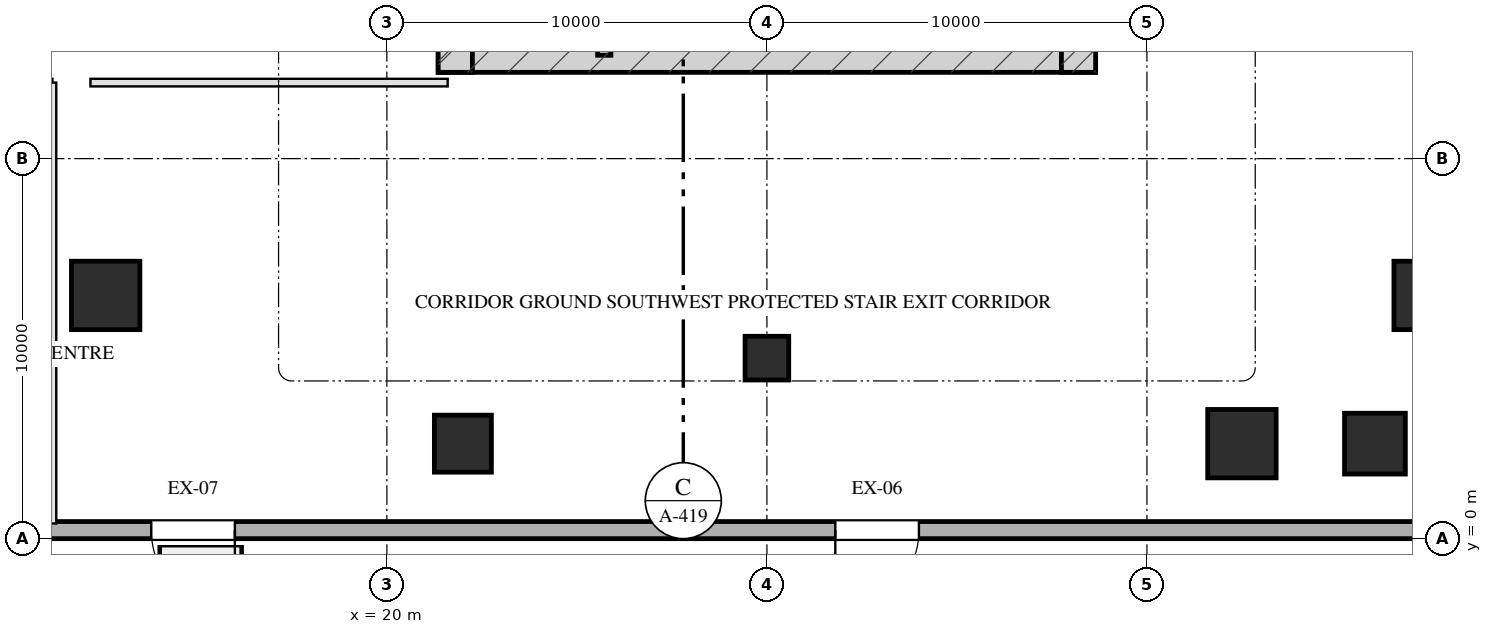
"""IFC4 building model, lengths in metres.
Left out: names, types, materials, properties, quantities, classifications, styles, units other than length and angle.
Written with IfcOpenShell. Run it as: python <this file> out.ifc"""

import sys

from ifc_helpers import new_model, si_unit, direction, frame, frame_2d, origin, origin_2d, place, context, subcontext, project, spatial, rectangle, hollow_rectangle, extrude, element, fill, save


model = new_model("IFC4")
c1 = context("Model", 3, precision=1e-05, world=origin(), true_north=direction((0.0, 1.0)))
c2 = subcontext(c1, "Body", "Model", "MODEL_VIEW")
j1 = project(units=[si_unit("LENGTHUNIT", "METRE"), si_unit("PLANEANGLEUNIT", "RADIAN")], contexts=[c1])
p1 = place(None, origin())
s1 = spatial("IfcSite", under=j1, at=p1, CompositionType="ELEMENT")
p2 = place(p1, origin())
s2 = spatial("IfcBuilding", under=s1, at=p2, CompositionType="ELEMENT")
p3 = place(p2, origin())
s3 = spatial("IfcBuildingStorey", under=s2, at=p3, CompositionType="ELEMENT", Elevation=0.0)
p4 = place(p3, frame((21.35, 12.72, 0.0), z_axis=(0.0, 0.0, 1.0), x_axis=(1.0, 0.0, 0.0)))
e1 = element("IfcWall", 1, at=p4, inside=s3, PredefinedType="SHEAR", context=c2, shape_type="SweptSolid", body=[
    extrude(rectangle(XDim=17.3, YDim=0.9, at=frame_2d((8.65, 0.0))), origin(), (0.0, 0.0, 1.0), 6.0),
])
for number, where, z_axis, x_axis in (
    (2, (21.8, 22.05, 0.0), (0.0, 0.0, 1.0), (0.0, -1.0, 0.0)),
    (3, (38.2, 22.05, 0.0), (0.0, 0.0, 1.0), (0.0, -1.0, 0.0)),
):
    element("IfcWall", number, at=place(p3, frame(where, z_axis=z_axis, x_axis=x_axis)), inside=s3, PredefinedType="SHEAR", context=c2, shape_type="SweptSolid", body=[
        extrude(rectangle(XDim=9.78, YDim=0.9, at=frame_2d((4.89, 0.0))), origin(), (0.0, 0.0, 1.0), 6.0),
    ])
p5 = place(p3, frame((25.72, 19.7, 0.0), z_axis=(0.0, 0.0, 1.0), x_axis=(0.0, -1.0, 0.0)))
e4 = element("IfcWall", 4, at=p5, inside=s3, PredefinedType="SHEAR", context=c2, shape_type="SweptSolid", body=[
    extrude(rectangle(XDim=6.98, YDim=0.35, at=frame_2d((3.49, 0.0))), origin(), (0.0, 0.0, 1.0), 6.0),
])
p6 = place(p3, frame((22.0, 2.5, 0.0), z_axis=(0.0, 0.0, 1.0), x_axis=(1.0, 0.0, 0.0)))
e5 = element("IfcColumn", 5, at=p6, inside=s3, PredefinedType="COLUMN", context=c2, shape_type="SweptSolid", body=[
    extrude(rectangle(XDim=1.5, YDim=1.5, at=origin_2d()), origin(), (0.0, 0.0, 1.0), 6.001),
])
p7 = place(p3, frame((42.5, 2.5, 0.0), z_axis=(0.0, 0.0, 1.0), x_axis=(1.0, 0.0, 0.0)))
e6 = element("IfcColumn", 6, at=p7, inside=s3, PredefinedType="COLUMN", context=c2, shape_type="SweptSolid", body=[
    extrude(hollow_rectangle(XDim=1.8, YDim=1.8, WallThickness=0.06, at=origin_2d()), origin(), (0.0, 0.0, 1.0), 6.001),
])
p8 = place(p3, frame((46.0, 2.5, 0.0), z_axis=(0.0, 0.0, 1.0), x_axis=(1.0, 0.0, 0.0)))
e7 = element("IfcColumn", 7, at=p8, inside=s3, PredefinedType="COLUMN", context=c2, shape_type="SweptSolid", body=[
    extrude(hollow_rectangle(XDim=1.6, YDim=1.6, WallThickness=0.055, at=origin_2d()), origin(), (0.0, 0.0, 1.0), 6.001),
])
for number, where, z_axis, x_axis in (
    (8, (12.6, 6.4, 0.0), (0.0, 0.0, 1.0), (1.0, 0.0, 0.0)),
    (9, (47.4, 6.4, 0.0), (0.0, 0.0, 1.0), (1.0, 0.0, 0.0)),
):
    element("IfcColumn", number, at=place(p3, frame(where, z_axis=z_axis, x_axis=x_axis)), inside=s3, PredefinedType="COLUMN", context=c2, shape_type="SweptSolid", body=[
        extrude(hollow_rectangle(XDim=1.8, YDim=1.8, WallThickness=0.06, at=origin_2d()), origin(), (0.0, 0.0, 1.0), 6.001),
    ])
p9 = place(p3, frame((30.0, 4.75, 0.0), z_axis=(0.0, 0.0, 1.0), x_axis=(1.0, 0.0, 0.0)))
e10 = element("IfcColumn", 10, at=p9, inside=s3, PredefinedType="COLUMN", context=c2, shape_type="SweptSolid", body=[
    extrude(hollow_rectangle(XDim=1.15, YDim=1.15, WallThickness=0.04, at=origin_2d()), origin(), (0.0, 0.0, 1.0), 6.001),
])
p10 = place(p3, frame((120.0, 0.225, 0.0), z_axis=(0.0, 0.0, 1.0), x_axis=(-1.0, 0.0, 0.0)))
e11 = element("IfcWall", 11, at=p10, inside=s3, PredefinedType="SOLIDWALL", context=c2, shape_type="SweptSolid", body=[
    extrude(rectangle(XDim=120.0, YDim=0.45, at=frame_2d((60.0, 0.0))), origin(), (0.0, 0.0, 1.0), 5.7),
])
p11 = place(p10, frame((13.0, 0.0, 0.0)))
e12 = element("IfcOpeningElement", 12, at=p11, cuts=e11, PredefinedType="OPENING", context=c2, shape_type="SweptSolid", body=[
    extrude(rectangle(XDim=2.2, YDim=2.4, at=frame_2d((1.1, 1.2))), frame((0.0, 0.235, 0.0), z_axis=(0.0, -1.0, 0.0), x_axis=(1.0, 0.0, 0.0)), (0.0, 0.0, 1.0), 0.47),
])
p12 = place(p10, frame((27.0, 0.0, 0.0)))
e13 = element("IfcOpeningElement", 13, at=p12, cuts=e11, PredefinedType="OPENING", context=c2, shape_type="SweptSolid", body=[
    extrude(rectangle(XDim=2.2, YDim=2.4, at=frame_2d((1.1, 1.2))), frame((0.0, 0.235, 0.0), z_axis=(0.0, -1.0, 0.0), x_axis=(1.0, 0.0, 0.0)), (0.0, 0.0, 1.0), 0.47),
])
p13 = place(p10, frame((51.0, 0.0, 0.0)))
e14 = element("IfcOpeningElement", 14, at=p13, cuts=e11, PredefinedType="OPENING", context=c2, shape_type="SweptSolid", body=[
    extrude(rectangle(XDim=2.2, YDim=2.4, at=frame_2d((1.1, 1.2))), frame((0.0, 0.235, 0.0), z_axis=(0.0, -1.0, 0.0), x_axis=(1.0, 0.0, 0.0)), (0.0, 0.0, 1.0), 0.47),
])
p14 = place(p10, frame((59.0, 0.0, 0.0)))
e15 = element("IfcOpeningElement", 15, at=p14, cuts=e11, PredefinedType="OPENING", context=c2, shape_type="SweptSolid", body=[
    extrude(rectangle(XDim=2.2, YDim=2.4, at=frame_2d((1.1, 1.2))), frame((0.0, 0.235, 0.0), z_axis=(0.0, -1.0, 0.0), x_axis=(1.0, 0.0, 0.0)), (0.0, 0.0, 1.0), 0.47),
])
p15 = place(p10, frame((67.0, 0.0, 0.0)))
e16 = element("IfcOpeningElement", 16, at=p15, cuts=e11, PredefinedType="OPENING", context=c2, shape_type="SweptSolid", body=[
    extrude(rectangle(XDim=2.2, YDim=2.4, at=frame_2d((1.1, 1.2))), frame((0.0, 0.235, 0.0), z_axis=(0.0, -1.0, 0.0), x_axis=(1.0, 0.0, 0.0)), (0.0, 0.0, 1.0), 0.47),
])
p16 = place(p10, frame((86.0, 0.0, 0.0)))
e17 = element("IfcOpeningElement", 17, at=p16, cuts=e11, PredefinedType="OPENING", context=c2, shape_type="SweptSolid", body=[
    extrude(rectangle(XDim=2.2, YDim=2.4, at=frame_2d((1.1, 1.2))), frame((0.0, 0.235, 0.0), z_axis=(0.0, -1.0, 0.0), x_axis=(1.0, 0.0, 0.0)), (0.0, 0.0, 1.0), 0.47),
])
p17 = place(p10, frame((104.0, 0.0, 0.0)))
e18 = element("IfcOpeningElement", 18, at=p17, cuts=e11, PredefinedType="OPENING", context=c2, shape_type="SweptSolid", body=[
    extrude(rectangle(XDim=2.2, YDim=2.4, at=frame_2d((1.1, 1.2))), frame((0.0, 0.235, 0.0), z_axis=(0.0, -1.0, 0.0), x_axis=(1.0, 0.0, 0.0)), (0.0, 0.0, 1.0), 0.47),
])
p18 = place(p3, frame((11.2, 0.4, 0.0), z_axis=(0.0, 0.0, 1.0), x_axis=(0.0, 1.0, 0.0)))
e19 = element("IfcWall", 19, at=p18, inside=s3, PredefinedType="PARTITIONING", context=c2, shape_type="SweptSolid", body=[
    extrude(rectangle(XDim=11.6, YDim=0.2, at=frame_2d((5.8, 0.0))), origin(), (0.0, 0.0, 1.0), 5.685),
])
p19 = place(p3, frame((12.2, 12.0, 0.0), z_axis=(0.0, 0.0, 1.0), x_axis=(1.0, 0.0, 0.0)))
e20 = element("IfcWall", 20, at=p19, inside=s3, PredefinedType="PARTITIONING", context=c2, shape_type="SweptSolid", body=[
    extrude(rectangle(XDim=9.4, YDim=0.2, at=frame_2d((4.7, 0.0))), origin(), (0.0, 0.0, 1.0), 5.685),
])
p20 = place(p16, origin())
e21 = element("IfcDoor", 21, at=p20, inside=s3, OperationType="SINGLE_SWING_RIGHT", PredefinedType="DOOR", context=c2, shape_type="SweptSolid", body=[
    extrude(rectangle(XDim=2.2, YDim=2.4, at=frame_2d((1.1, 1.2))), frame((0.0, 0.025, 0.0), z_axis=(0.0, -1.0, 0.0), x_axis=(1.0, 0.0, 0.0)), (0.0, 0.0, 1.0), 0.05),
])
fill(e17, e21)
p21 = place(p17, origin())
e22 = element("IfcDoor", 22, at=p21, inside=s3, OperationType="SINGLE_SWING_LEFT", PredefinedType="DOOR", context=c2, shape_type="SweptSolid", body=[
    extrude(rectangle(XDim=2.2, YDim=2.4, at=frame_2d((1.1, 1.2))), frame((0.0, 0.025, 0.0), z_axis=(0.0, -1.0, 0.0), x_axis=(1.0, 0.0, 0.0)), (0.0, 0.0, 1.0), 0.05),
])
fill(e18, e22)
save(model, sys.argv[1])
